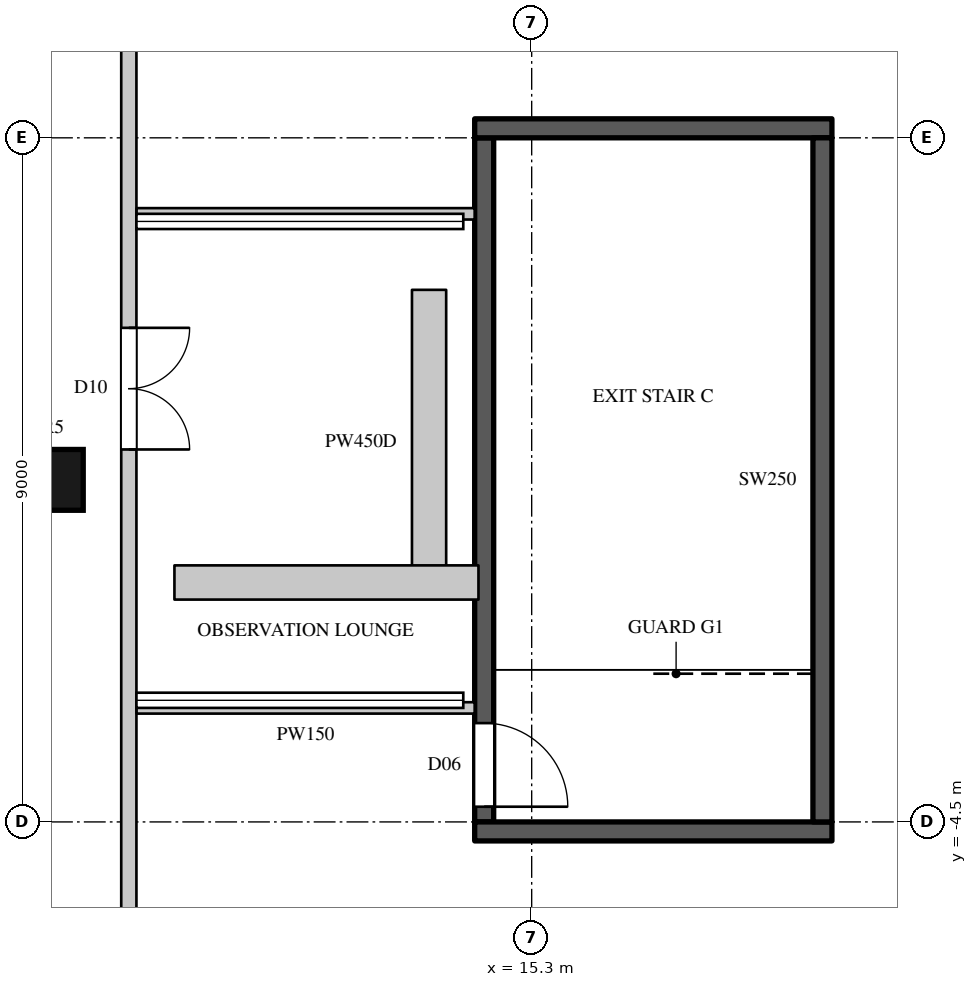
"""IFC4 building model, lengths in metres.
Left out: names, types, materials, properties, quantities, classifications, styles, units other than length and angle.
Written with IfcOpenShell. Run it as: python <this file> out.ifc"""

import sys

from ifc_helpers import new_model, si_unit, direction, frame, frame_2d, origin, origin_2d, place, context, subcontext, project, spatial, rectangle, circle, extrude, element, fill, save


model = new_model("IFC4")
c1 = context("Model", 3, precision=1e-05, world=origin(), true_north=direction((0.0, 1.0)))
c2 = subcontext(c1, "Body", "Model", "MODEL_VIEW")
j1 = project(units=[si_unit("LENGTHUNIT", "METRE"), si_unit("PLANEANGLEUNIT", "RADIAN")], contexts=[c1])
p1 = place(None, origin())
s1 = spatial("IfcSite", under=j1, at=p1, CompositionType="ELEMENT")
p2 = place(p1, origin())
s2 = spatial("IfcBuilding", under=s1, at=p2, CompositionType="ELEMENT")
p3 = place(p2, frame((0.0, 0.0, 329.5)))
s3 = spatial("IfcBuildingStorey", under=s2, at=p3, CompositionType="ELEMENT", Elevation=329.5)
p4 = place(p3, frame((9.0, 0.0, 0.0), z_axis=(0.0, 0.0, 1.0), x_axis=(1.0, 0.0, 0.0)))
e1 = element("IfcColumn", 1, at=p4, inside=s3, PredefinedType="COLUMN", context=c2, shape_type="SweptSolid", body=[
    extrude(circle(Radius=0.4, at=origin_2d()), origin(), (0.0, 0.0, 1.0), 5.5),
])
for number, where, z_axis, x_axis in (
    (2, (13.95, 2.5, 0.0), (0.0, 0.0, 1.0), (0.0, -1.0, 0.0)),
    (3, (14.6, -1.35, 0.0), (0.0, 0.0, 1.0), (-1.0, 0.0, 0.0)),
):
    element("IfcWall", number, at=place(p3, frame(where, z_axis=z_axis, x_axis=x_axis)), inside=s3, PredefinedType="SOLIDWALL", context=c2, shape_type="SweptSolid", body=[
        extrude(rectangle(XDim=4.0, YDim=0.45, at=frame_2d((2.0, 0.0))), origin(), (0.0, 0.0, 1.0), 0.6),
    ])
p5 = place(p3, frame((10.0, -10.9, 0.0), z_axis=(0.0, 0.0, 1.0), x_axis=(0.0, 1.0, 0.0)))
e4 = element("IfcWall", 4, at=p5, inside=s3, PredefinedType="PARTITIONING", context=c2, shape_type="SweptSolid", body=[
    extrude(rectangle(XDim=22.8, YDim=0.2, at=frame_2d((11.4, 0.0))), origin(), (0.0, 0.0, 1.0), 5.098),
])
p6 = place(p5, frame((11.3, 0.0, 0.0)))
e5 = element("IfcOpeningElement", 5, at=p6, cuts=e4, PredefinedType="OPENING", context=c2, shape_type="SweptSolid", body=[
    extrude(rectangle(XDim=1.6, YDim=2.4, at=frame_2d((0.8, 1.2))), frame((0.0, 0.11, 0.0), z_axis=(0.0, -1.0, 0.0), x_axis=(1.0, 0.0, 0.0)), (0.0, 0.0, 1.0), 0.22),
])
for number, where, z_axis, x_axis in (
    (6, (10.102, -3.0, 0.0), (0.0, 0.0, 1.0), (1.0, 0.0, 0.0)),
    (7, (10.102, 3.5, 0.0), (0.0, 0.0, 1.0), (1.0, 0.0, 0.0)),
):
    element("IfcWall", number, at=place(p3, frame(where, z_axis=z_axis, x_axis=x_axis)), inside=s3, PredefinedType="PARTITIONING", context=c2, shape_type="SweptSolid", body=[
        extrude(rectangle(XDim=4.448, YDim=0.15, at=frame_2d((2.224, 0.0))), origin(), (0.0, 0.0, 1.0), 5.098),
    ])
p7 = place(p3, frame((14.675, -4.5, 0.0), z_axis=(0.0, 0.0, 1.0), x_axis=(0.0, 1.0, 0.0)))
e8 = element("IfcWall", 8, at=p7, inside=s3, PredefinedType="SHEAR", context=c2, shape_type="SweptSolid", body=[
    extrude(rectangle(XDim=9.0, YDim=0.25, at=frame_2d((4.5, 0.0))), origin(), (0.0, 0.0, 1.0), 5.098),
])
p8 = place(p7, frame((0.2, 0.0, 0.0)))
e9 = element("IfcOpeningElement", 9, at=p8, cuts=e8, PredefinedType="OPENING", context=c2, shape_type="SweptSolid", body=[
    extrude(rectangle(XDim=1.1, YDim=2.2, at=frame_2d((0.55, 1.1))), frame((0.0, 0.135, 0.0), z_axis=(0.0, -1.0, 0.0), x_axis=(1.0, 0.0, 0.0)), (0.0, 0.0, 1.0), 0.27),
])
for number, where, z_axis, x_axis in (
    (10, (14.55, -4.625, 0.0), (0.0, 0.0, 1.0), (1.0, 0.0, 0.0)),
    (11, (14.55, 4.625, 0.0), (0.0, 0.0, 1.0), (1.0, 0.0, 0.0)),
):
    element("IfcWall", number, at=place(p3, frame(where, z_axis=z_axis, x_axis=x_axis)), inside=s3, PredefinedType="SHEAR", context=c2, shape_type="SweptSolid", body=[
        extrude(rectangle(XDim=4.7, YDim=0.25, at=frame_2d((2.35, 0.0))), origin(), (0.0, 0.0, 1.0), 5.098),
    ])
p9 = place(p3, frame((19.125, -4.5, 0.0), z_axis=(0.0, 0.0, 1.0), x_axis=(0.0, 1.0, 0.0)))
e12 = element("IfcWall", 12, at=p9, inside=s3, PredefinedType="SHEAR", context=c2, shape_type="SweptSolid", body=[
    extrude(rectangle(XDim=9.0, YDim=0.25, at=frame_2d((4.5, 0.0))), origin(), (0.0, 0.0, 1.0), 5.098),
])
p10 = place(p6, origin())
e13 = element("IfcDoor", 13, at=p10, inside=s3, OperationType="DOUBLE_DOOR_SINGLE_SWING", PredefinedType="DOOR", context=c2, shape_type="SweptSolid", body=[
    extrude(rectangle(XDim=1.6, YDim=2.4, at=frame_2d((0.8, 1.2))), frame((0.0, 0.025, 0.0), z_axis=(0.0, -1.0, 0.0), x_axis=(1.0, 0.0, 0.0)), (0.0, 0.0, 1.0), 0.05),
])
fill(e5, e13)
p11 = place(p8, origin())
e14 = element("IfcDoor", 14, at=p11, inside=s3, OperationType="SINGLE_SWING_RIGHT", PredefinedType="DOOR", context=c2, shape_type="SweptSolid", body=[
    extrude(rectangle(XDim=1.1, YDim=2.2, at=frame_2d((0.55, 1.1))), frame((0.0, 0.025, 0.0), z_axis=(0.0, -1.0, 0.0), x_axis=(1.0, 0.0, 0.0)), (0.0, 0.0, 1.0), 0.05),
])
fill(e9, e14)
save(model, sys.argv[1])
